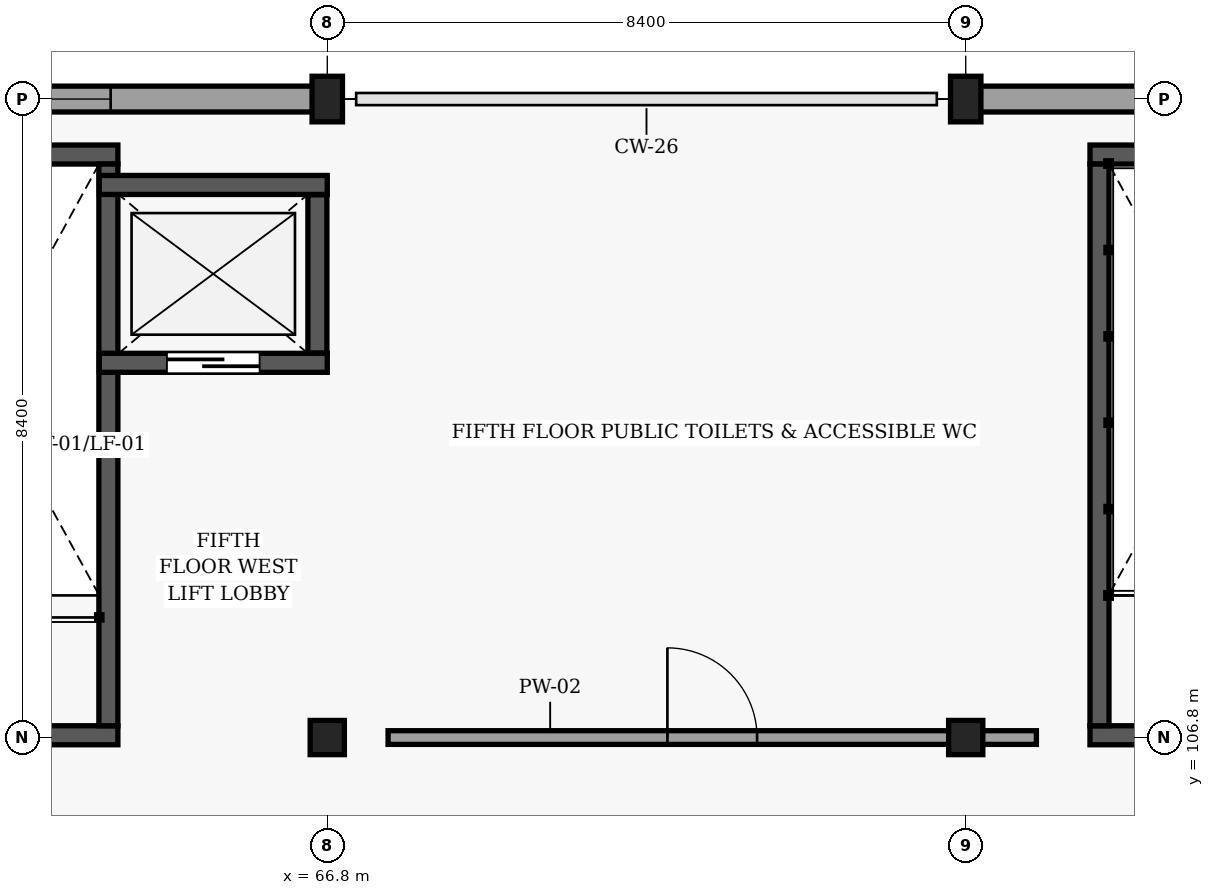
"""IFC4 building model, lengths in metres.
Left out: names, types, materials, properties, quantities, classifications, styles, units other than length and angle.
Written with IfcOpenShell. Run it as: python <this file> out.ifc"""

import sys

from ifc_helpers import new_model, si_unit, direction, frame, frame_2d, origin, origin_2d, place, context, subcontext, project, spatial, rectangle, extrude, element, fill, save


model = new_model("IFC4")
c1 = context("Model", 3, precision=1e-05, world=origin(), true_north=direction((0.0, 1.0)))
c2 = subcontext(c1, "Body", "Model", "MODEL_VIEW")
j1 = project(units=[si_unit("LENGTHUNIT", "METRE"), si_unit("PLANEANGLEUNIT", "RADIAN")], contexts=[c1])
p1 = place(None, origin())
s1 = spatial("IfcSite", under=j1, at=p1, CompositionType="ELEMENT")
p2 = place(p1, origin())
s2 = spatial("IfcBuilding", under=s1, at=p2, CompositionType="ELEMENT")
p3 = place(p2, frame((0.0, 0.0, 20.1)))
s3 = spatial("IfcBuildingStorey", under=s2, at=p3, CompositionType="ELEMENT", Elevation=20.1)
p4 = place(p3, frame((66.8, 106.8, 0.0), z_axis=(0.0, 0.0, 1.0), x_axis=(1.0, 0.0, 0.0)))
e1 = element("IfcColumn", 1, at=p4, inside=s3, PredefinedType="COLUMN", context=c2, shape_type="SweptSolid", body=[
    extrude(rectangle(XDim=0.45, YDim=0.45, at=origin_2d()), origin(), (0.0, 0.0, 1.0), 4.2),
])
p5 = place(p3, frame((66.8, 115.2, 0.0), z_axis=(0.0, 0.0, 1.0), x_axis=(1.0, 0.0, 0.0)))
e2 = element("IfcColumn", 2, at=p5, inside=s3, PredefinedType="COLUMN", context=c2, shape_type="SweptSolid", body=[
    extrude(rectangle(XDim=0.4, YDim=0.6, at=origin_2d()), origin(), (0.0, 0.0, 1.0), 4.2),
])
p6 = place(p3, frame((75.2, 106.8, 0.0), z_axis=(0.0, 0.0, 1.0), x_axis=(1.0, 0.0, 0.0)))
e3 = element("IfcColumn", 3, at=p6, inside=s3, PredefinedType="COLUMN", context=c2, shape_type="SweptSolid", body=[
    extrude(rectangle(XDim=0.45, YDim=0.45, at=origin_2d()), origin(), (0.0, 0.0, 1.0), 4.2),
])
p7 = place(p3, frame((75.2, 115.2, 0.0), z_axis=(0.0, 0.0, 1.0), x_axis=(1.0, 0.0, 0.0)))
e4 = element("IfcColumn", 4, at=p7, inside=s3, PredefinedType="COLUMN", context=c2, shape_type="SweptSolid", body=[
    extrude(rectangle(XDim=0.4, YDim=0.6, at=origin_2d()), origin(), (0.0, 0.0, 1.0), 4.2),
])
p8 = place(p3, frame((58.5, 115.2, 0.0), z_axis=(0.0, 0.0, 1.0), x_axis=(1.0, 0.0, 0.0)))
e5 = element("IfcWall", 5, at=p8, inside=s3, PredefinedType="SOLIDWALL", context=c2, shape_type="SweptSolid", body=[
    extrude(rectangle(XDim=8.2, YDim=0.34, at=frame_2d((4.1, 0.0))), origin(), (0.0, 0.0, 1.0), 3.568),
])
p9 = place(p8, frame((2.75, 0.0, 0.948)))
e6 = element("IfcOpeningElement", 6, at=p9, cuts=e5, PredefinedType="OPENING", context=c2, shape_type="SweptSolid", body=[
    extrude(rectangle(XDim=2.7, YDim=2.4, at=frame_2d((1.35, 1.2))), frame((0.0, 0.18, 0.0), z_axis=(0.0, -1.0, 0.0), x_axis=(1.0, 0.0, 0.0)), (0.0, 0.0, 1.0), 0.36),
])
p10 = place(p3, frame((75.3, 115.2, 0.0), z_axis=(0.0, 0.0, 1.0), x_axis=(1.0, 0.0, 0.0)))
e7 = element("IfcWall", 7, at=p10, inside=s3, PredefinedType="SOLIDWALL", context=c2, shape_type="SweptSolid", body=[
    extrude(rectangle(XDim=8.6, YDim=0.34, at=frame_2d((4.3, 0.0))), origin(), (0.0, 0.0, 1.0), 3.568),
])
p11 = place(p10, frame((2.7, 0.0, 0.95)))
e8 = element("IfcOpeningElement", 8, at=p11, cuts=e7, PredefinedType="OPENING", context=c2, shape_type="SweptSolid", body=[
    extrude(rectangle(XDim=3.2, YDim=2.1, at=frame_2d((1.6, 1.05))), frame((0.0, 0.18, 0.0), z_axis=(0.0, -1.0, 0.0), x_axis=(1.0, 0.0, 0.0)), (0.0, 0.0, 1.0), 0.36),
])
p12 = place(p3, frame((64.045, 106.83, 0.0), z_axis=(0.0, 0.0, 1.0), x_axis=(-1.0, 0.0, 0.0)))
e9 = element("IfcWall", 9, at=p12, inside=s3, PredefinedType="SHEAR", context=c2, shape_type="SweptSolid", body=[
    extrude(rectangle(XDim=3.61, YDim=0.25, at=frame_2d((1.805, 0.0))), origin(), (0.0, 0.0, 1.0), 4.0),
])
p13 = place(p12, frame((1.205, 0.0, 0.0)))
e10 = element("IfcOpeningElement", 10, at=p13, cuts=e9, PredefinedType="OPENING", context=c2, shape_type="SweptSolid", body=[
    extrude(rectangle(XDim=1.2, YDim=2.15, at=frame_2d((0.6, 1.075))), frame((0.0, 0.135, 0.0), z_axis=(0.0, -1.0, 0.0), x_axis=(1.0, 0.0, 0.0)), (0.0, 0.0, 1.0), 0.27),
])
p14 = place(p3, frame((60.435, 114.47, 0.0), z_axis=(0.0, 0.0, 1.0), x_axis=(1.0, 0.0, 0.0)))
e11 = element("IfcWall", 11, at=p14, inside=s3, PredefinedType="SHEAR", context=c2, shape_type="SweptSolid", body=[
    extrude(rectangle(XDim=3.61, YDim=0.25, at=frame_2d((1.805, 0.0))), origin(), (0.0, 0.0, 1.0), 4.0),
])
p15 = place(p3, frame((63.92, 114.345, 0.0), z_axis=(0.0, 0.0, 1.0), x_axis=(0.0, -1.0, 0.0)))
e12 = element("IfcWall", 12, at=p15, inside=s3, PredefinedType="SHEAR", context=c2, shape_type="SweptSolid", body=[
    extrude(rectangle(XDim=7.39, YDim=0.25, at=frame_2d((3.695, 0.0))), origin(), (0.0, 0.0, 1.0), 4.0),
])
p16 = place(p3, frame((63.8, 111.73, 0.0), z_axis=(0.0, 0.0, 1.0), x_axis=(1.0, 0.0, 0.0)))
e13 = element("IfcWall", 13, at=p16, inside=s3, PredefinedType="SHEAR", context=c2, shape_type="SweptSolid", body=[
    extrude(rectangle(XDim=3.0, YDim=0.25, at=frame_2d((1.5, 0.0))), origin(), (0.0, 0.0, 1.0), 4.0),
])
p17 = place(p16, frame((0.89, 0.0, 0.0)))
e14 = element("IfcOpeningElement", 14, at=p17, cuts=e13, PredefinedType="OPENING", context=c2, shape_type="SweptSolid", body=[
    extrude(rectangle(XDim=1.22, YDim=2.18, at=frame_2d((0.61, 1.09))), frame((0.0, 0.135, 0.0), z_axis=(0.0, -1.0, 0.0), x_axis=(1.0, 0.0, 0.0)), (0.0, 0.0, 1.0), 0.27),
])
p18 = place(p3, frame((66.8, 114.07, 0.0), z_axis=(0.0, 0.0, 1.0), x_axis=(-1.0, 0.0, 0.0)))
e15 = element("IfcWall", 15, at=p18, inside=s3, PredefinedType="SHEAR", context=c2, shape_type="SweptSolid", body=[
    extrude(rectangle(XDim=3.0, YDim=0.25, at=frame_2d((1.5, 0.0))), origin(), (0.0, 0.0, 1.0), 4.0),
])
p19 = place(p3, frame((66.67, 111.86, 0.0), z_axis=(0.0, 0.0, 1.0), x_axis=(0.0, 1.0, 0.0)))
e16 = element("IfcWall", 16, at=p19, inside=s3, PredefinedType="SHEAR", context=c2, shape_type="SweptSolid", body=[
    extrude(rectangle(XDim=2.08, YDim=0.25, at=frame_2d((1.04, 0.0))), origin(), (0.0, 0.0, 1.0), 4.0),
])
p20 = place(p3, frame((80.445, 106.83, 0.0), z_axis=(0.0, 0.0, 1.0), x_axis=(-1.0, 0.0, 0.0)))
e17 = element("IfcWall", 17, at=p20, inside=s3, PredefinedType="SHEAR", context=c2, shape_type="SweptSolid", body=[
    extrude(rectangle(XDim=3.61, YDim=0.25, at=frame_2d((1.805, 0.0))), origin(), (0.0, 0.0, 1.0), 4.0),
])
p21 = place(p20, frame((1.235, 0.0, 0.0)))
e18 = element("IfcOpeningElement", 18, at=p21, cuts=e17, PredefinedType="OPENING", context=c2, shape_type="SweptSolid", body=[
    extrude(rectangle(XDim=1.14, YDim=2.15, at=frame_2d((0.57, 1.075))), frame((0.0, 0.135, 0.0), z_axis=(0.0, -1.0, 0.0), x_axis=(1.0, 0.0, 0.0)), (0.0, 0.0, 1.0), 0.27),
])
p22 = place(p3, frame((76.835, 114.47, 0.0), z_axis=(0.0, 0.0, 1.0), x_axis=(1.0, 0.0, 0.0)))
e19 = element("IfcWall", 19, at=p22, inside=s3, PredefinedType="SHEAR", context=c2, shape_type="SweptSolid", body=[
    extrude(rectangle(XDim=3.61, YDim=0.25, at=frame_2d((1.805, 0.0))), origin(), (0.0, 0.0, 1.0), 4.0),
])
p23 = place(p3, frame((76.96, 106.955, 0.0), z_axis=(0.0, 0.0, 1.0), x_axis=(0.0, 1.0, 0.0)))
e20 = element("IfcWall", 20, at=p23, inside=s3, PredefinedType="SHEAR", context=c2, shape_type="SweptSolid", body=[
    extrude(rectangle(XDim=7.39, YDim=0.25, at=frame_2d((3.695, 0.0))), origin(), (0.0, 0.0, 1.0), 4.0),
])
p24 = place(p3, frame((67.6, 106.8, 0.0), z_axis=(0.0, 0.0, 1.0), x_axis=(1.0, 0.0, 0.0)))
e21 = element("IfcWall", 21, at=p24, inside=s3, PredefinedType="PARTITIONING", context=c2, shape_type="SweptSolid", body=[
    extrude(rectangle(XDim=8.53, YDim=0.18, at=frame_2d((4.265, 0.0))), origin(), (0.0, 0.0, 1.0), 3.568),
])
p25 = place(p24, frame((3.675, 0.0, 0.0)))
e22 = element("IfcOpeningElement", 22, at=p25, cuts=e21, PredefinedType="OPENING", context=c2, shape_type="SweptSolid", body=[
    extrude(rectangle(XDim=1.18, YDim=2.18, at=frame_2d((0.59, 1.09))), frame((0.0, 0.1, 0.0), z_axis=(0.0, -1.0, 0.0), x_axis=(1.0, 0.0, 0.0)), (0.0, 0.0, 1.0), 0.2),
])
p26 = place(p9, origin())
e23 = element("IfcWindow", 23, at=p26, inside=s3, PartitioningType="SINGLE_PANEL", PredefinedType="WINDOW", context=c2, shape_type="SweptSolid", body=[
    extrude(rectangle(XDim=2.7, YDim=2.4, at=frame_2d((1.35, 1.2))), frame((0.0, 0.03, 0.0), z_axis=(0.0, -1.0, 0.0), x_axis=(1.0, 0.0, 0.0)), (0.0, 0.0, 1.0), 0.06),
])
fill(e6, e23)
p27 = place(p17, origin())
e24 = element("IfcDoor", 24, at=p27, inside=s3, OperationType="SLIDING_TO_RIGHT", PredefinedType="DOOR", context=c2, shape_type="SweptSolid", body=[
    extrude(rectangle(XDim=1.22, YDim=2.18, at=frame_2d((0.61, 1.09))), frame((0.0, 0.025, 0.0), z_axis=(0.0, -1.0, 0.0), x_axis=(1.0, 0.0, 0.0)), (0.0, 0.0, 1.0), 0.05),
])
fill(e14, e24)
p28 = place(p25, origin())
e25 = element("IfcDoor", 25, at=p28, inside=s3, OperationType="SINGLE_SWING_LEFT", PredefinedType="DOOR", context=c2, shape_type="SweptSolid", body=[
    extrude(rectangle(XDim=1.18, YDim=2.18, at=frame_2d((0.59, 1.09))), frame((0.0, 0.025, 0.0), z_axis=(0.0, -1.0, 0.0), x_axis=(1.0, 0.0, 0.0)), (0.0, 0.0, 1.0), 0.05),
])
fill(e22, e25)
save(model, sys.argv[1])
